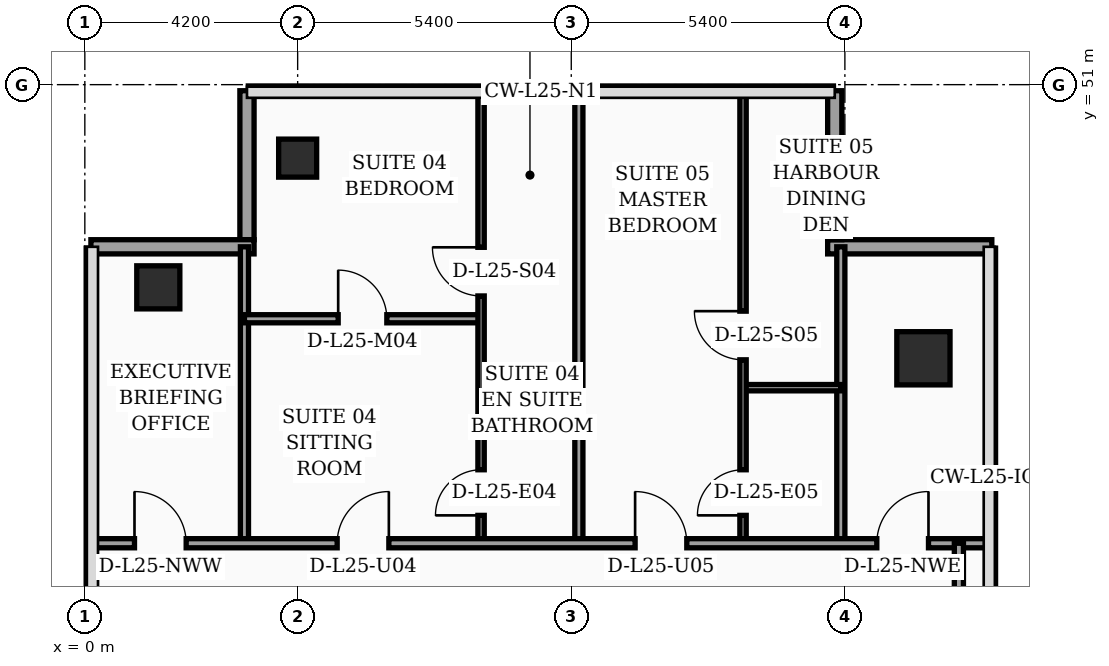
"""IFC4 building model, lengths in metres.
Left out: names, types, materials, properties, quantities, classifications, styles, units other than length and angle.
Written with IfcOpenShell. Run it as: python <this file> out.ifc"""

import sys

from ifc_helpers import new_model, si_unit, direction, frame, frame_2d, origin, origin_2d, place, context, subcontext, project, spatial, rectangle, hollow_rectangle, extrude, element, fill, save


model = new_model("IFC4")
c1 = context("Model", 3, precision=1e-05, world=origin(), true_north=direction((0.0, 1.0)))
c2 = subcontext(c1, "Body", "Model", "MODEL_VIEW")
j1 = project(units=[si_unit("LENGTHUNIT", "METRE"), si_unit("PLANEANGLEUNIT", "RADIAN")], contexts=[c1])
p1 = place(None, origin())
s1 = spatial("IfcSite", under=j1, at=p1, CompositionType="ELEMENT")
p2 = place(p1, origin())
s2 = spatial("IfcBuilding", under=s1, at=p2, CompositionType="ELEMENT")
p3 = place(p2, frame((0.0, 0.0, 105.0)))
s3 = spatial("IfcBuildingStorey", under=s2, at=p3, CompositionType="ELEMENT", Elevation=105.0)
p4 = place(p3, frame((1.45, 47.0, 0.0), z_axis=(0.0, 0.0, 1.0), x_axis=(1.0, 0.0, 0.0)))
e1 = element("IfcColumn", 1, at=p4, inside=s3, PredefinedType="COLUMN", context=c2, shape_type="SweptSolid", body=[
    extrude(hollow_rectangle(XDim=0.85, YDim=0.85, WallThickness=0.036, at=origin_2d()), origin(), (0.0, 0.0, 1.0), 3.56),
])
p5 = place(p3, frame((4.2, 49.55, 0.0), z_axis=(0.0, 0.0, 1.0), x_axis=(1.0, 0.0, 0.0)))
e2 = element("IfcColumn", 2, at=p5, inside=s3, PredefinedType="COLUMN", context=c2, shape_type="SweptSolid", body=[
    extrude(hollow_rectangle(XDim=0.75, YDim=0.75, WallThickness=0.032, at=origin_2d()), origin(), (0.0, 0.0, 1.0), 3.56),
])
p6 = place(p3, frame((16.55, 45.6, 0.0), z_axis=(0.0, 0.0, 1.0), x_axis=(1.0, 0.0, 0.0)))
e3 = element("IfcColumn", 3, at=p6, inside=s3, PredefinedType="COLUMN", context=c2, shape_type="SweptSolid", body=[
    extrude(rectangle(XDim=1.05, YDim=1.05, at=origin_2d()), origin(), (0.0, 0.0, 1.0), 3.56),
])
p7 = place(p3, frame((17.9, 47.8, 0.0), z_axis=(0.0, 0.0, 1.0), x_axis=(-1.0, 0.0, 0.0)))
e4 = element("IfcWall", 4, at=p7, inside=s3, PredefinedType="SOLIDWALL", context=c2, shape_type="SweptSolid", body=[
    extrude(rectangle(XDim=3.24, YDim=0.28, at=frame_2d((1.62, 0.0))), origin(), (0.0, 0.0, 1.0), 3.56),
])
p8 = place(p3, frame((14.8, 47.94, 0.0), z_axis=(0.0, 0.0, 1.0), x_axis=(0.0, 1.0, 0.0)))
e5 = element("IfcWall", 5, at=p8, inside=s3, PredefinedType="SOLIDWALL", context=c2, shape_type="SweptSolid", body=[
    extrude(rectangle(XDim=2.94, YDim=0.28, at=frame_2d((1.47, 0.0))), origin(), (0.0, 0.0, 1.0), 3.56),
])
p9 = place(p3, frame((3.2, 50.88, 0.0), z_axis=(0.0, 0.0, 1.0), x_axis=(0.0, -1.0, 0.0)))
e6 = element("IfcWall", 6, at=p9, inside=s3, PredefinedType="SOLIDWALL", context=c2, shape_type="SweptSolid", body=[
    extrude(rectangle(XDim=2.94, YDim=0.28, at=frame_2d((1.47, 0.0))), origin(), (0.0, 0.0, 1.0), 3.04),
])
p10 = place(p3, frame((3.34, 47.8, 0.0), z_axis=(0.0, 0.0, 1.0), x_axis=(-1.0, 0.0, 0.0)))
e7 = element("IfcWall", 7, at=p10, inside=s3, PredefinedType="SOLIDWALL", context=c2, shape_type="SweptSolid", body=[
    extrude(rectangle(XDim=3.22, YDim=0.28, at=frame_2d((1.61, 0.0))), origin(), (0.0, 0.0, 1.0), 3.04),
])
p11 = place(p3, frame((3.15, 41.95, 0.0), z_axis=(0.0, 0.0, 1.0), x_axis=(0.0, 1.0, 0.0)))
e8 = element("IfcWall", 8, at=p11, inside=s3, PredefinedType="PARTITIONING", context=c2, shape_type="SweptSolid", body=[
    extrude(rectangle(XDim=5.85, YDim=0.16, at=frame_2d((2.925, 0.0))), origin(), (0.0, 0.0, 1.0), 3.14),
])
p12 = place(p3, frame((14.92, 41.95, 0.0), z_axis=(0.0, 0.0, 1.0), x_axis=(0.0, 1.0, 0.0)))
e9 = element("IfcWall", 9, at=p12, inside=s3, PredefinedType="PARTITIONING", context=c2, shape_type="SweptSolid", body=[
    extrude(rectangle(XDim=5.85, YDim=0.16, at=frame_2d((2.925, 0.0))), origin(), (0.0, 0.0, 1.0), 3.04),
])
p13 = place(p3, frame((7.82, 45.02, 0.0), z_axis=(0.0, 0.0, 1.0), x_axis=(1.0, 0.0, 0.0)))
e10 = element("IfcWall", 10, at=p13, inside=s3, PredefinedType="PARTITIONING", context=c2, shape_type="SweptSolid", body=[
    extrude(rectangle(XDim=1.93, YDim=0.125, at=frame_2d((0.965, 0.0))), origin(), (0.0, 0.0, 1.0), 3.56),
])
p14 = place(p3, frame((3.15, 46.38, 0.0), z_axis=(0.0, 0.0, 1.0), x_axis=(1.0, 0.0, 0.0)))
e11 = element("IfcWall", 11, at=p14, inside=s3, PredefinedType="PARTITIONING", context=c2, shape_type="SweptSolid", body=[
    extrude(rectangle(XDim=4.67, YDim=0.16, at=frame_2d((2.335, 0.0))), origin(), (0.0, 0.0, 1.0), 2.84),
])
p15 = place(p14, frame((1.85, 0.0, 0.0)))
e12 = element("IfcOpeningElement", 12, at=p15, cuts=e11, PredefinedType="OPENING", context=c2, shape_type="SweptSolid", body=[
    extrude(rectangle(XDim=0.96, YDim=2.2, at=frame_2d((0.48, 1.1))), frame((0.0, 0.09, 0.0), z_axis=(0.0, -1.0, 0.0), x_axis=(1.0, 0.0, 0.0)), (0.0, 0.0, 1.0), 0.18),
])
p16 = place(p3, frame((7.82, 41.95, 0.0), z_axis=(0.0, 0.0, 1.0), x_axis=(0.0, 1.0, 0.0)))
e13 = element("IfcWall", 13, at=p16, inside=s3, PredefinedType="PARTITIONING", context=c2, shape_type="SweptSolid", body=[
    extrude(rectangle(XDim=8.99, YDim=0.125, at=frame_2d((4.495, 0.0))), origin(), (0.0, 0.0, 1.0), 3.04),
])
p17 = place(p16, frame((0.55, 0.0, 0.0)))
e14 = element("IfcOpeningElement", 14, at=p17, cuts=e13, PredefinedType="OPENING", context=c2, shape_type="SweptSolid", body=[
    extrude(rectangle(XDim=0.9, YDim=2.15, at=frame_2d((0.45, 1.075))), frame((0.0, 0.073, 0.0), z_axis=(0.0, -1.0, 0.0), x_axis=(1.0, 0.0, 0.0)), (0.0, 0.0, 1.0), 0.145),
])
p18 = place(p16, frame((4.88, 0.0, 0.0)))
e15 = element("IfcOpeningElement", 15, at=p18, cuts=e13, PredefinedType="OPENING", context=c2, shape_type="SweptSolid", body=[
    extrude(rectangle(XDim=0.96, YDim=2.2, at=frame_2d((0.48, 1.1))), frame((0.0, 0.073, 0.0), z_axis=(0.0, -1.0, 0.0), x_axis=(1.0, 0.0, 0.0)), (0.0, 0.0, 1.0), 0.145),
])
p19 = place(p3, frame((12.99, 45.02, 0.0), z_axis=(0.0, 0.0, 1.0), x_axis=(1.0, 0.0, 0.0)))
e16 = element("IfcWall", 16, at=p19, inside=s3, PredefinedType="PARTITIONING", context=c2, shape_type="SweptSolid", body=[
    extrude(rectangle(XDim=1.93, YDim=0.125, at=frame_2d((0.965, 0.0))), origin(), (0.0, 0.0, 1.0), 3.56),
])
p20 = place(p3, frame((12.99, 41.95, 0.0), z_axis=(0.0, 0.0, 1.0), x_axis=(0.0, 1.0, 0.0)))
e17 = element("IfcWall", 17, at=p20, inside=s3, PredefinedType="PARTITIONING", context=c2, shape_type="SweptSolid", body=[
    extrude(rectangle(XDim=8.99, YDim=0.125, at=frame_2d((4.495, 0.0))), origin(), (0.0, 0.0, 1.0), 3.04),
])
p21 = place(p20, frame((0.55, 0.0, 0.0)))
e18 = element("IfcOpeningElement", 18, at=p21, cuts=e17, PredefinedType="OPENING", context=c2, shape_type="SweptSolid", body=[
    extrude(rectangle(XDim=0.9, YDim=2.15, at=frame_2d((0.45, 1.075))), frame((0.0, 0.073, 0.0), z_axis=(0.0, -1.0, 0.0), x_axis=(1.0, 0.0, 0.0)), (0.0, 0.0, 1.0), 0.145),
])
p22 = place(p20, frame((3.62, 0.0, 0.0)))
e19 = element("IfcOpeningElement", 19, at=p22, cuts=e17, PredefinedType="OPENING", context=c2, shape_type="SweptSolid", body=[
    extrude(rectangle(XDim=0.96, YDim=2.2, at=frame_2d((0.48, 1.1))), frame((0.0, 0.073, 0.0), z_axis=(0.0, -1.0, 0.0), x_axis=(1.0, 0.0, 0.0)), (0.0, 0.0, 1.0), 0.145),
])
p23 = place(p3, frame((9.75, 41.95, 0.0), z_axis=(0.0, 0.0, 1.0), x_axis=(0.0, 1.0, 0.0)))
e20 = element("IfcWall", 20, at=p23, inside=s3, PredefinedType="PARTITIONING", context=c2, shape_type="SweptSolid", body=[
    extrude(rectangle(XDim=8.99, YDim=0.16, at=frame_2d((4.495, 0.0))), origin(), (0.0, 0.0, 1.0), 3.04),
])
p24 = place(p3, frame((0.08, 41.95, 0.0), z_axis=(0.0, 0.0, 1.0), x_axis=(1.0, 0.0, 0.0)))
e21 = element("IfcWall", 21, at=p24, inside=s3, PredefinedType="PARTITIONING", context=c2, shape_type="SweptSolid", body=[
    extrude(rectangle(XDim=17.77, YDim=0.18, at=frame_2d((8.885, 0.0))), origin(), (0.0, 0.0, 1.0), 2.84),
])
p25 = place(p24, frame((0.9, 0.0, 0.0)))
e22 = element("IfcOpeningElement", 22, at=p25, cuts=e21, PredefinedType="OPENING", context=c2, shape_type="SweptSolid", body=[
    extrude(rectangle(XDim=1.02, YDim=2.2, at=frame_2d((0.51, 1.1))), frame((0.0, 0.1, 0.0), z_axis=(0.0, -1.0, 0.0), x_axis=(1.0, 0.0, 0.0)), (0.0, 0.0, 1.0), 0.2),
])
p26 = place(p24, frame((4.9, 0.0, 0.0)))
e23 = element("IfcOpeningElement", 23, at=p26, cuts=e21, PredefinedType="OPENING", context=c2, shape_type="SweptSolid", body=[
    extrude(rectangle(XDim=1.02, YDim=2.2, at=frame_2d((0.51, 1.1))), frame((0.0, 0.1, 0.0), z_axis=(0.0, -1.0, 0.0), x_axis=(1.0, 0.0, 0.0)), (0.0, 0.0, 1.0), 0.2),
])
p27 = place(p24, frame((10.78, 0.0, 0.0)))
e24 = element("IfcOpeningElement", 24, at=p27, cuts=e21, PredefinedType="OPENING", context=c2, shape_type="SweptSolid", body=[
    extrude(rectangle(XDim=1.02, YDim=2.2, at=frame_2d((0.51, 1.1))), frame((0.0, 0.1, 0.0), z_axis=(0.0, -1.0, 0.0), x_axis=(1.0, 0.0, 0.0)), (0.0, 0.0, 1.0), 0.2),
])
p28 = place(p24, frame((15.55, 0.0, 0.0)))
e25 = element("IfcOpeningElement", 25, at=p28, cuts=e21, PredefinedType="OPENING", context=c2, shape_type="SweptSolid", body=[
    extrude(rectangle(XDim=1.02, YDim=2.2, at=frame_2d((0.51, 1.1))), frame((0.0, 0.1, 0.0), z_axis=(0.0, -1.0, 0.0), x_axis=(1.0, 0.0, 0.0)), (0.0, 0.0, 1.0), 0.2),
])
p29 = place(p3, frame((17.25, 24.3, 0.0), z_axis=(0.0, 0.0, 1.0), x_axis=(0.0, 1.0, 0.0)))
e26 = element("IfcWall", 26, at=p29, inside=s3, PredefinedType="PARTITIONING", context=c2, shape_type="SweptSolid", body=[
    extrude(rectangle(XDim=17.65, YDim=0.18, at=frame_2d((8.825, 0.0))), origin(), (0.0, 0.0, 1.0), 2.84),
])
p30 = place(p15, origin())
e27 = element("IfcDoor", 27, at=p30, inside=s3, OperationType="SINGLE_SWING_LEFT", PredefinedType="DOOR", context=c2, shape_type="SweptSolid", body=[
    extrude(rectangle(XDim=0.96, YDim=2.2, at=frame_2d((0.48, 1.1))), frame((0.0, 0.025, 0.0), z_axis=(0.0, -1.0, 0.0), x_axis=(1.0, 0.0, 0.0)), (0.0, 0.0, 1.0), 0.05),
])
fill(e12, e27)
p31 = place(p17, origin())
e28 = element("IfcDoor", 28, at=p31, inside=s3, OperationType="SINGLE_SWING_LEFT", PredefinedType="DOOR", context=c2, shape_type="SweptSolid", body=[
    extrude(rectangle(XDim=0.9, YDim=2.15, at=frame_2d((0.45, 1.075))), frame((0.0, 0.025, 0.0), z_axis=(0.0, -1.0, 0.0), x_axis=(1.0, 0.0, 0.0)), (0.0, 0.0, 1.0), 0.05),
])
fill(e14, e28)
p32 = place(p18, origin())
e29 = element("IfcDoor", 29, at=p32, inside=s3, OperationType="SINGLE_SWING_RIGHT", PredefinedType="DOOR", context=c2, shape_type="SweptSolid", body=[
    extrude(rectangle(XDim=0.96, YDim=2.2, at=frame_2d((0.48, 1.1))), frame((0.0, 0.025, 0.0), z_axis=(0.0, -1.0, 0.0), x_axis=(1.0, 0.0, 0.0)), (0.0, 0.0, 1.0), 0.05),
])
fill(e15, e29)
p33 = place(p21, origin())
e30 = element("IfcDoor", 30, at=p33, inside=s3, OperationType="SINGLE_SWING_LEFT", PredefinedType="DOOR", context=c2, shape_type="SweptSolid", body=[
    extrude(rectangle(XDim=0.9, YDim=2.15, at=frame_2d((0.45, 1.075))), frame((0.0, 0.025, 0.0), z_axis=(0.0, -1.0, 0.0), x_axis=(1.0, 0.0, 0.0)), (0.0, 0.0, 1.0), 0.05),
])
fill(e18, e30)
p34 = place(p22, origin())
e31 = element("IfcDoor", 31, at=p34, inside=s3, OperationType="SINGLE_SWING_RIGHT", PredefinedType="DOOR", context=c2, shape_type="SweptSolid", body=[
    extrude(rectangle(XDim=0.96, YDim=2.2, at=frame_2d((0.48, 1.1))), frame((0.0, 0.025, 0.0), z_axis=(0.0, -1.0, 0.0), x_axis=(1.0, 0.0, 0.0)), (0.0, 0.0, 1.0), 0.05),
])
fill(e19, e31)
p35 = place(p25, origin())
e32 = element("IfcDoor", 32, at=p35, inside=s3, OperationType="SINGLE_SWING_LEFT", PredefinedType="DOOR", context=c2, shape_type="SweptSolid", body=[
    extrude(rectangle(XDim=1.02, YDim=2.2, at=frame_2d((0.51, 1.1))), frame((0.0, 0.025, 0.0), z_axis=(0.0, -1.0, 0.0), x_axis=(1.0, 0.0, 0.0)), (0.0, 0.0, 1.0), 0.05),
])
fill(e22, e32)
p36 = place(p26, origin())
e33 = element("IfcDoor", 33, at=p36, inside=s3, OperationType="SINGLE_SWING_RIGHT", PredefinedType="DOOR", context=c2, shape_type="SweptSolid", body=[
    extrude(rectangle(XDim=1.02, YDim=2.2, at=frame_2d((0.51, 1.1))), frame((0.0, 0.025, 0.0), z_axis=(0.0, -1.0, 0.0), x_axis=(1.0, 0.0, 0.0)), (0.0, 0.0, 1.0), 0.05),
])
fill(e23, e33)
p37 = place(p27, origin())
e34 = element("IfcDoor", 34, at=p37, inside=s3, OperationType="SINGLE_SWING_LEFT", PredefinedType="DOOR", context=c2, shape_type="SweptSolid", body=[
    extrude(rectangle(XDim=1.02, YDim=2.2, at=frame_2d((0.51, 1.1))), frame((0.0, 0.025, 0.0), z_axis=(0.0, -1.0, 0.0), x_axis=(1.0, 0.0, 0.0)), (0.0, 0.0, 1.0), 0.05),
])
fill(e24, e34)
p38 = place(p28, origin())
e35 = element("IfcDoor", 35, at=p38, inside=s3, OperationType="SINGLE_SWING_RIGHT", PredefinedType="DOOR", context=c2, shape_type="SweptSolid", body=[
    extrude(rectangle(XDim=1.02, YDim=2.2, at=frame_2d((0.51, 1.1))), frame((0.0, 0.025, 0.0), z_axis=(0.0, -1.0, 0.0), x_axis=(1.0, 0.0, 0.0)), (0.0, 0.0, 1.0), 0.05),
])
fill(e25, e35)
save(model, sys.argv[1])
